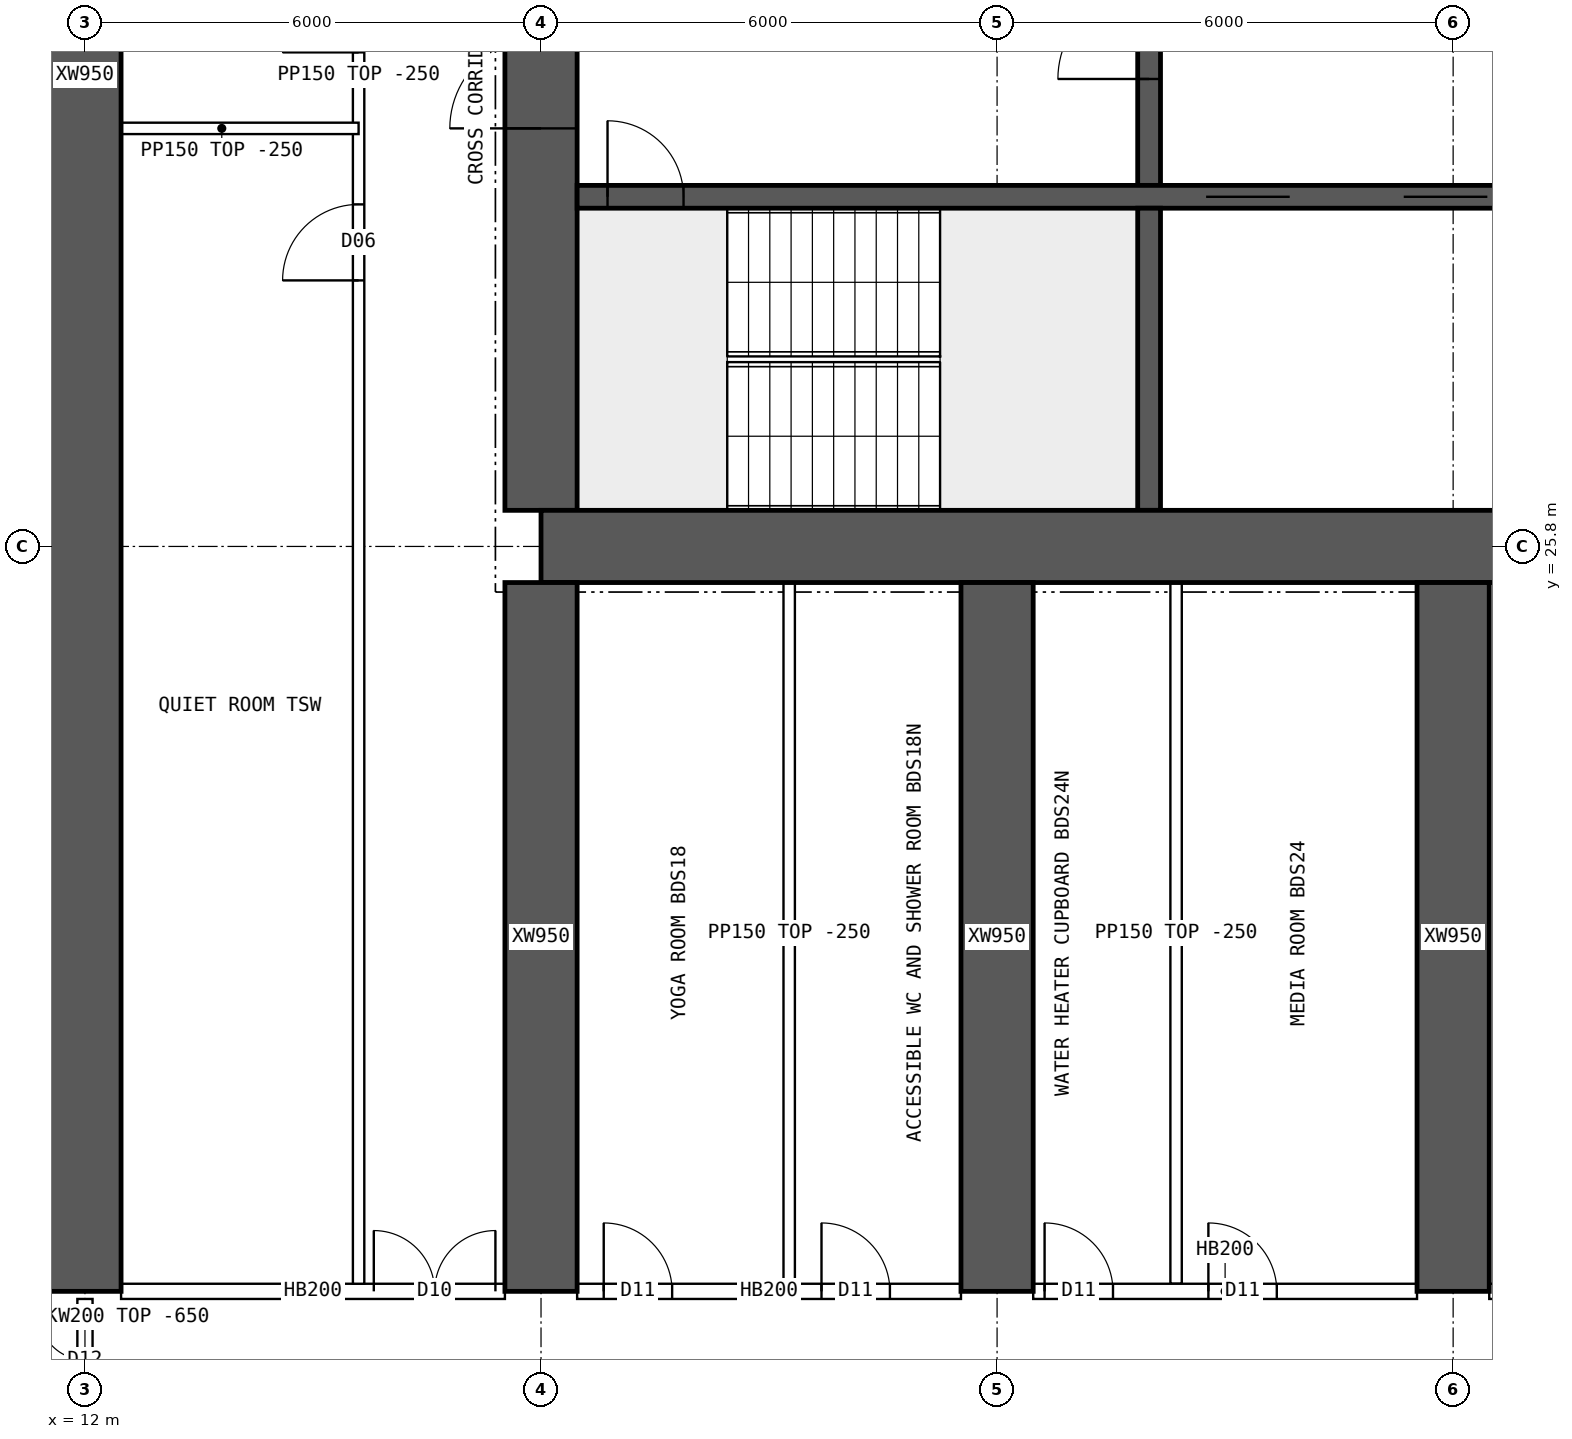
"""IFC4 building model, lengths in metres.
Left out: names, types, materials, properties, quantities, classifications, styles, units other than length and angle.
Written with IfcOpenShell. Run it as: python <this file> out.ifc"""

import sys

from ifc_helpers import new_model, si_unit, direction, frame, frame_2d, origin, place, context, subcontext, project, spatial, polyline, rectangle, outline, extrude, element, fill, save


model = new_model("IFC4")
c1 = context("Model", 3, precision=1e-05, world=origin(), true_north=direction((0.0, 1.0)))
c2 = subcontext(c1, "Body", "Model", "MODEL_VIEW")
j1 = project(units=[si_unit("LENGTHUNIT", "METRE"), si_unit("PLANEANGLEUNIT", "RADIAN")], contexts=[c1])
p1 = place(None, origin())
s1 = spatial("IfcSite", under=j1, at=p1, CompositionType="ELEMENT")
p2 = place(p1, origin())
s2 = spatial("IfcBuilding", under=s1, at=p2, CompositionType="ELEMENT")
p3 = place(p2, frame((0.0, 0.0, 84.4)))
s3 = spatial("IfcBuildingStorey", under=s2, at=p3, CompositionType="ELEMENT", Elevation=84.4)
p4 = place(p3, frame((18.0, 25.8, 0.0), z_axis=(0.0, 0.0, 1.0), x_axis=(1.0, 0.0, 0.0)))
e1 = element("IfcWall", 1, at=p4, inside=s3, PredefinedType="SHEAR", context=c2, shape_type="SweptSolid", body=[
    extrude(rectangle(XDim=48.0, YDim=0.95, at=frame_2d((24.0, 0.0))), origin(), (0.0, 0.0, 1.0), 3.75),
])
p5 = place(p3, frame((18.0, 26.275, 0.0), z_axis=(0.0, 0.0, 1.0), x_axis=(0.0, 1.0, 0.0)))
e2 = element("IfcWall", 2, at=p5, inside=s3, PredefinedType="SHEAR", context=c2, shape_type="SweptSolid", body=[
    extrude(rectangle(XDim=11.45, YDim=0.95, at=frame_2d((5.725, 0.0))), origin(), (0.0, 0.0, 1.0), 3.75),
])
p6 = place(p5, frame((5.025, 0.0, 0.0)))
e3 = element("IfcOpeningElement", 3, at=p6, cuts=e2, PredefinedType="OPENING", context=c2, shape_type="SweptSolid", body=[
    extrude(rectangle(XDim=1.2, YDim=2.1, at=frame_2d((0.6, 1.05))), frame((0.0, 0.485, 0.0), z_axis=(0.0, -1.0, 0.0), x_axis=(1.0, 0.0, 0.0)), (0.0, 0.0, 1.0), 0.97),
])
p7 = place(p3, frame((18.475, 30.4, 0.0), z_axis=(0.0, 0.0, 1.0), x_axis=(1.0, 0.0, 0.0)))
e4 = element("IfcWall", 4, at=p7, inside=s3, PredefinedType="SHEAR", context=c2, shape_type="SweptSolid", body=[
    extrude(rectangle(XDim=47.05, YDim=0.3, at=frame_2d((23.525, 0.0))), origin(), (0.0, 0.0, 1.0), 3.75),
])
p8 = place(p7, frame((0.4, 0.0, 0.0)))
e5 = element("IfcOpeningElement", 5, at=p8, cuts=e4, PredefinedType="OPENING", context=c2, shape_type="SweptSolid", body=[
    extrude(rectangle(XDim=1.0, YDim=2.1, at=frame_2d((0.5, 1.05))), frame((0.0, 0.16, 0.0), z_axis=(0.0, -1.0, 0.0), x_axis=(1.0, 0.0, 0.0)), (0.0, 0.0, 1.0), 0.32),
])
p9 = place(p7, frame((45.65, 0.0, 0.0)))
e6 = element("IfcOpeningElement", 6, at=p9, cuts=e4, PredefinedType="OPENING", context=c2, shape_type="SweptSolid", body=[
    extrude(rectangle(XDim=1.0, YDim=2.1, at=frame_2d((0.5, 1.05))), frame((0.0, 0.16, 0.0), z_axis=(0.0, -1.0, 0.0), x_axis=(1.0, 0.0, 0.0)), (0.0, 0.0, 1.0), 0.32),
])
p10 = place(p7, frame((8.275, 0.0, 0.0)))
e7 = element("IfcOpeningElement", 7, at=p10, cuts=e4, PredefinedType="OPENING", context=c2, shape_type="SweptSolid", body=[
    extrude(rectangle(XDim=1.1, YDim=2.1, at=frame_2d((0.55, 1.05))), frame((0.0, 0.16, 0.0), z_axis=(0.0, -1.0, 0.0), x_axis=(1.0, 0.0, 0.0)), (0.0, 0.0, 1.0), 0.32),
])
p11 = place(p7, frame((10.875, 0.0, 0.0)))
e8 = element("IfcOpeningElement", 8, at=p11, cuts=e4, PredefinedType="OPENING", context=c2, shape_type="SweptSolid", body=[
    extrude(rectangle(XDim=1.1, YDim=2.1, at=frame_2d((0.55, 1.05))), frame((0.0, 0.16, 0.0), z_axis=(0.0, -1.0, 0.0), x_axis=(1.0, 0.0, 0.0)), (0.0, 0.0, 1.0), 0.32),
])
p12 = place(p7, frame((13.475, 0.0, 0.0)))
e9 = element("IfcOpeningElement", 9, at=p12, cuts=e4, PredefinedType="OPENING", context=c2, shape_type="SweptSolid", body=[
    extrude(rectangle(XDim=1.1, YDim=2.1, at=frame_2d((0.55, 1.05))), frame((0.0, 0.16, 0.0), z_axis=(0.0, -1.0, 0.0), x_axis=(1.0, 0.0, 0.0)), (0.0, 0.0, 1.0), 0.32),
])
p13 = place(p7, frame((16.075, 0.0, 0.0)))
e10 = element("IfcOpeningElement", 10, at=p13, cuts=e4, PredefinedType="OPENING", context=c2, shape_type="SweptSolid", body=[
    extrude(rectangle(XDim=1.1, YDim=2.1, at=frame_2d((0.55, 1.05))), frame((0.0, 0.16, 0.0), z_axis=(0.0, -1.0, 0.0), x_axis=(1.0, 0.0, 0.0)), (0.0, 0.0, 1.0), 0.32),
])
p14 = place(p7, frame((18.85, 0.0, 0.0)))
e11 = element("IfcOpeningElement", 11, at=p14, cuts=e4, PredefinedType="OPENING", context=c2, shape_type="SweptSolid", body=[
    extrude(rectangle(XDim=0.9, YDim=2.1, at=frame_2d((0.45, 1.05))), frame((0.0, 0.16, 0.0), z_axis=(0.0, -1.0, 0.0), x_axis=(1.0, 0.0, 0.0)), (0.0, 0.0, 1.0), 0.32),
])
p15 = place(p7, frame((30.142, 0.0, 0.0)))
e12 = element("IfcOpeningElement", 12, at=p15, cuts=e4, PredefinedType="OPENING", context=c2, shape_type="SweptSolid", body=[
    extrude(rectangle(XDim=1.1, YDim=2.1, at=frame_2d((0.55, 1.05))), frame((0.0, 0.16, 0.0), z_axis=(0.0, -1.0, 0.0), x_axis=(1.0, 0.0, 0.0)), (0.0, 0.0, 1.0), 0.32),
])
p16 = place(p7, frame((33.675, 0.0, 0.0)))
e13 = element("IfcOpeningElement", 13, at=p16, cuts=e4, PredefinedType="OPENING", context=c2, shape_type="SweptSolid", body=[
    extrude(rectangle(XDim=1.1, YDim=2.1, at=frame_2d((0.55, 1.05))), frame((0.0, 0.16, 0.0), z_axis=(0.0, -1.0, 0.0), x_axis=(1.0, 0.0, 0.0)), (0.0, 0.0, 1.0), 0.32),
])
p17 = place(p7, frame((37.208, 0.0, 0.0)))
e14 = element("IfcOpeningElement", 14, at=p17, cuts=e4, PredefinedType="OPENING", context=c2, shape_type="SweptSolid", body=[
    extrude(rectangle(XDim=1.1, YDim=2.1, at=frame_2d((0.55, 1.05))), frame((0.0, 0.16, 0.0), z_axis=(0.0, -1.0, 0.0), x_axis=(1.0, 0.0, 0.0)), (0.0, 0.0, 1.0), 0.32),
])
p18 = place(p3, frame((26.0, 26.275, 0.0), z_axis=(0.0, 0.0, 1.0), x_axis=(0.0, 1.0, 0.0)))
e15 = element("IfcWall", 15, at=p18, inside=s3, PredefinedType="SHEAR", context=c2, shape_type="SweptSolid", body=[
    extrude(rectangle(XDim=3.975, YDim=0.3, at=frame_2d((1.988, 0.0))), origin(), (0.0, 0.0, 1.0), 3.75),
])
p19 = place(p3, frame((26.0, 30.55, 0.0), z_axis=(0.0, 0.0, 1.0), x_axis=(0.0, 1.0, 0.0)))
e16 = element("IfcWall", 16, at=p19, inside=s3, PredefinedType="SHEAR", context=c2, shape_type="SweptSolid", body=[
    extrude(rectangle(XDim=3.9, YDim=0.3, at=frame_2d((1.95, 0.0))), origin(), (0.0, 0.0, 1.0), 3.75),
])
p20 = place(p19, frame((1.4, 0.0, 0.0)))
e17 = element("IfcOpeningElement", 17, at=p20, cuts=e16, PredefinedType="OPENING", context=c2, shape_type="SweptSolid", body=[
    extrude(rectangle(XDim=1.2, YDim=2.1, at=frame_2d((0.6, 1.05))), frame((0.0, 0.16, 0.0), z_axis=(0.0, -1.0, 0.0), x_axis=(1.0, 0.0, 0.0)), (0.0, 0.0, 1.0), 0.32),
])
p21 = place(p3, frame((12.0, 16.0, 0.0), z_axis=(0.0, 0.0, 1.0), x_axis=(0.0, 1.0, 0.0)))
e18 = element("IfcWall", 18, at=p21, inside=s3, PredefinedType="SHEAR", context=c2, shape_type="SweptSolid", body=[
    extrude(rectangle(XDim=32.0, YDim=0.95, at=frame_2d((16.0, 0.0))), origin(), (0.0, 0.0, 1.0), 3.75),
])
for number, where, z_axis, x_axis in (
    (19, (18.0, 16.0, 0.0), (0.0, 0.0, 1.0), (0.0, 1.0, 0.0)),
    (20, (24.0, 16.0, 0.0), (0.0, 0.0, 1.0), (0.0, 1.0, 0.0)),
    (21, (30.0, 16.0, 0.0), (0.0, 0.0, 1.0), (0.0, 1.0, 0.0)),
):
    element("IfcWall", number, at=place(p3, frame(where, z_axis=z_axis, x_axis=x_axis)), inside=s3, PredefinedType="SHEAR", context=c2, shape_type="SweptSolid", body=[
        extrude(rectangle(XDim=9.325, YDim=0.95, at=frame_2d((4.663, 0.0))), origin(), (0.0, 0.0, 1.0), 3.75),
    ])
p22 = place(p3, frame((12.475, 16.0, 0.0), z_axis=(0.0, 0.0, 1.0), x_axis=(1.0, 0.0, 0.0)))
e22 = element("IfcWall", 22, at=p22, inside=s3, PredefinedType="SOLIDWALL", context=c2, shape_type="SweptSolid", body=[
    extrude(rectangle(XDim=5.05, YDim=0.2, at=frame_2d((2.525, 0.0))), origin(), (0.0, 0.0, 1.0), 3.5),
])
p23 = place(p22, frame((3.325, 0.0, 0.0)))
e23 = element("IfcOpeningElement", 23, at=p23, cuts=e22, PredefinedType="OPENING", context=c2, shape_type="SweptSolid", body=[
    extrude(rectangle(XDim=1.6, YDim=2.1, at=frame_2d((0.8, 1.05))), frame((0.0, 0.11, 0.0), z_axis=(0.0, -1.0, 0.0), x_axis=(1.0, 0.0, 0.0)), (0.0, 0.0, 1.0), 0.22),
])
p24 = place(p3, frame((18.475, 16.0, 0.0), z_axis=(0.0, 0.0, 1.0), x_axis=(1.0, 0.0, 0.0)))
e24 = element("IfcWall", 24, at=p24, inside=s3, PredefinedType="SOLIDWALL", context=c2, shape_type="SweptSolid", body=[
    extrude(rectangle(XDim=5.05, YDim=0.2, at=frame_2d((2.525, 0.0))), origin(), (0.0, 0.0, 1.0), 3.5),
])
p25 = place(p24, frame((0.35, 0.0, 0.0)))
e25 = element("IfcOpeningElement", 25, at=p25, cuts=e24, PredefinedType="OPENING", context=c2, shape_type="SweptSolid", body=[
    extrude(rectangle(XDim=0.9, YDim=2.1, at=frame_2d((0.45, 1.05))), frame((0.0, 0.11, 0.0), z_axis=(0.0, -1.0, 0.0), x_axis=(1.0, 0.0, 0.0)), (0.0, 0.0, 1.0), 0.22),
])
p26 = place(p24, frame((3.215, 0.0, 0.0)))
e26 = element("IfcOpeningElement", 26, at=p26, cuts=e24, PredefinedType="OPENING", context=c2, shape_type="SweptSolid", body=[
    extrude(rectangle(XDim=0.9, YDim=2.1, at=frame_2d((0.45, 1.05))), frame((0.0, 0.11, 0.0), z_axis=(0.0, -1.0, 0.0), x_axis=(1.0, 0.0, 0.0)), (0.0, 0.0, 1.0), 0.22),
])
p27 = place(p3, frame((24.475, 16.0, 0.0), z_axis=(0.0, 0.0, 1.0), x_axis=(1.0, 0.0, 0.0)))
e27 = element("IfcWall", 27, at=p27, inside=s3, PredefinedType="SOLIDWALL", context=c2, shape_type="SweptSolid", body=[
    extrude(rectangle(XDim=5.05, YDim=0.2, at=frame_2d((2.525, 0.0))), origin(), (0.0, 0.0, 1.0), 3.5),
])
p28 = place(p27, frame((0.15, 0.0, 0.0)))
e28 = element("IfcOpeningElement", 28, at=p28, cuts=e27, PredefinedType="OPENING", context=c2, shape_type="SweptSolid", body=[
    extrude(rectangle(XDim=0.9, YDim=2.1, at=frame_2d((0.45, 1.05))), frame((0.0, 0.11, 0.0), z_axis=(0.0, -1.0, 0.0), x_axis=(1.0, 0.0, 0.0)), (0.0, 0.0, 1.0), 0.22),
])
p29 = place(p27, frame((2.305, 0.0, 0.0)))
e29 = element("IfcOpeningElement", 29, at=p29, cuts=e27, PredefinedType="OPENING", context=c2, shape_type="SweptSolid", body=[
    extrude(rectangle(XDim=0.9, YDim=2.1, at=frame_2d((0.45, 1.05))), frame((0.0, 0.11, 0.0), z_axis=(0.0, -1.0, 0.0), x_axis=(1.0, 0.0, 0.0)), (0.0, 0.0, 1.0), 0.22),
])
p30 = place(p3, frame((30.475, 16.0, 0.0), z_axis=(0.0, 0.0, 1.0), x_axis=(1.0, 0.0, 0.0)))
e30 = element("IfcWall", 30, at=p30, inside=s3, PredefinedType="SOLIDWALL", context=c2, shape_type="SweptSolid", body=[
    extrude(rectangle(XDim=5.05, YDim=0.2, at=frame_2d((2.525, 0.0))), origin(), (0.0, 0.0, 1.0), 3.5),
])
p31 = place(p30, frame((0.35, 0.0, 0.0)))
e31 = element("IfcOpeningElement", 31, at=p31, cuts=e30, PredefinedType="OPENING", context=c2, shape_type="SweptSolid", body=[
    extrude(rectangle(XDim=0.9, YDim=2.1, at=frame_2d((0.45, 1.05))), frame((0.0, 0.11, 0.0), z_axis=(0.0, -1.0, 0.0), x_axis=(1.0, 0.0, 0.0)), (0.0, 0.0, 1.0), 0.22),
])
p32 = place(p30, frame((2.535, 0.0, 0.0)))
e32 = element("IfcOpeningElement", 32, at=p32, cuts=e30, PredefinedType="OPENING", context=c2, shape_type="SweptSolid", body=[
    extrude(rectangle(XDim=0.9, YDim=2.1, at=frame_2d((0.45, 1.05))), frame((0.0, 0.11, 0.0), z_axis=(0.0, -1.0, 0.0), x_axis=(1.0, 0.0, 0.0)), (0.0, 0.0, 1.0), 0.22),
])
for number, where, z_axis, x_axis in (
    (33, (21.265, 16.1, 0.0), (0.0, 0.0, 1.0), (0.0, 1.0, 0.0)),
    (34, (26.355, 16.1, 0.0), (0.0, 0.0, 1.0), (0.0, 1.0, 0.0)),
):
    element("IfcWall", number, at=place(p3, frame(where, z_axis=z_axis, x_axis=x_axis)), inside=s3, PredefinedType="PARTITIONING", context=c2, shape_type="SweptSolid", body=[
        extrude(rectangle(XDim=9.225, YDim=0.15, at=frame_2d((4.612, 0.0))), origin(), (0.0, 0.0, 1.0), 3.5),
    ])
p33 = place(p3, frame((15.6, 16.1, 0.0), z_axis=(0.0, 0.0, 1.0), x_axis=(0.0, 1.0, 0.0)))
e35 = element("IfcWall", 35, at=p33, inside=s3, PredefinedType="PARTITIONING", context=c2, shape_type="SweptSolid", body=[
    extrude(rectangle(XDim=31.8, YDim=0.15, at=frame_2d((15.9, 0.0))), origin(), (0.0, 0.0, 1.0), 3.5),
])
p34 = place(p33, frame((13.2, 0.0, 0.0)))
e36 = element("IfcOpeningElement", 36, at=p34, cuts=e35, PredefinedType="OPENING", context=c2, shape_type="SweptSolid", body=[
    extrude(rectangle(XDim=1.0, YDim=2.1, at=frame_2d((0.5, 1.05))), frame((0.0, 0.085, 0.0), z_axis=(0.0, -1.0, 0.0), x_axis=(1.0, 0.0, 0.0)), (0.0, 0.0, 1.0), 0.17),
])
p35 = place(p33, frame((16.2, 0.0, 0.0)))
e37 = element("IfcOpeningElement", 37, at=p35, cuts=e35, PredefinedType="OPENING", context=c2, shape_type="SweptSolid", body=[
    extrude(rectangle(XDim=1.0, YDim=2.1, at=frame_2d((0.5, 1.05))), frame((0.0, 0.085, 0.0), z_axis=(0.0, -1.0, 0.0), x_axis=(1.0, 0.0, 0.0)), (0.0, 0.0, 1.0), 0.17),
])
p36 = place(p3, frame((12.0, 31.3, 0.0), z_axis=(0.0, 0.0, 1.0), x_axis=(1.0, 0.0, 0.0)))
e38 = element("IfcWall", 38, at=p36, inside=s3, PredefinedType="PARTITIONING", context=c2, shape_type="SweptSolid", body=[
    extrude(rectangle(XDim=3.6, YDim=0.15, at=frame_2d((1.8, 0.0))), origin(), (0.0, 0.0, 1.0), 3.5),
])
p37 = place(p3, frame((3.905, 30.85, 0.0), z_axis=(0.0, 0.0, 1.0), x_axis=(1.0, 0.0, 0.0)))
e39 = element("IfcWall", 39, at=p37, inside=s3, PredefinedType="PARTITIONING", context=c2, shape_type="SweptSolid", body=[
    extrude(outline(polyline([(0.0, 0.0), (8.02, 0.0), (8.02, 3.5), (2.397, 3.5), (2.395, 3.05), (1.797, 3.05), (1.795, 3.5), (0.0, 3.5), (0.0, 0.0)])), frame((0.0, 0.075, 0.0), z_axis=(0.0, -1.0, 0.0), x_axis=(1.0, 0.0, 0.0)), (0.0, 0.0, 1.0), 0.15),
])
p38 = place(p3, frame((12.0, 14.3, 0.0), z_axis=(0.0, 0.0, 1.0), x_axis=(0.0, 1.0, 0.0)))
e40 = element("IfcWall", 40, at=p38, inside=s3, PredefinedType="SOLIDWALL", context=c2, shape_type="SweptSolid", body=[
    extrude(outline(polyline([(0.0, 0.0), (1.6, 0.0), (1.6, 3.1), (0.0, 3.1), (0.0, 0.0)])), frame((0.0, 0.1, 0.0), z_axis=(0.0, -1.0, 0.0), x_axis=(1.0, 0.0, 0.0)), (0.0, 0.0, 1.0), 0.2),
])
p39 = place(p38, frame((0.2, 0.0, 0.0)))
e41 = element("IfcOpeningElement", 41, at=p39, cuts=e40, PredefinedType="OPENING", context=c2, shape_type="SweptSolid", body=[
    extrude(rectangle(XDim=1.2, YDim=2.1, at=frame_2d((0.6, 1.05))), frame((0.0, 0.11, 0.0), z_axis=(0.0, -1.0, 0.0), x_axis=(1.0, 0.0, 0.0)), (0.0, 0.0, 1.0), 0.22),
])
p40 = place(p6, origin())
e42 = element("IfcDoor", 42, at=p40, inside=s3, OperationType="SINGLE_SWING_LEFT", PredefinedType="DOOR", context=c2, shape_type="SweptSolid", body=[
    extrude(rectangle(XDim=1.2, YDim=2.1, at=frame_2d((0.6, 1.05))), frame((0.0, 0.025, 0.0), z_axis=(0.0, -1.0, 0.0), x_axis=(1.0, 0.0, 0.0)), (0.0, 0.0, 1.0), 0.05),
])
fill(e3, e42)
p41 = place(p8, origin())
e43 = element("IfcDoor", 43, at=p41, inside=s3, OperationType="SINGLE_SWING_LEFT", PredefinedType="DOOR", context=c2, shape_type="SweptSolid", body=[
    extrude(rectangle(XDim=1.0, YDim=2.1, at=frame_2d((0.5, 1.05))), frame((0.0, 0.025, 0.0), z_axis=(0.0, -1.0, 0.0), x_axis=(1.0, 0.0, 0.0)), (0.0, 0.0, 1.0), 0.05),
])
fill(e5, e43)
p42 = place(p20, origin())
e44 = element("IfcDoor", 44, at=p42, inside=s3, OperationType="SINGLE_SWING_LEFT", PredefinedType="DOOR", context=c2, shape_type="SweptSolid", body=[
    extrude(rectangle(XDim=1.2, YDim=2.1, at=frame_2d((0.6, 1.05))), frame((0.0, 0.025, 0.0), z_axis=(0.0, -1.0, 0.0), x_axis=(1.0, 0.0, 0.0)), (0.0, 0.0, 1.0), 0.05),
])
fill(e17, e44)
p43 = place(p10, origin())
e45 = element("IfcDoor", 45, at=p43, inside=s3, OperationType="DOUBLE_DOOR_SLIDING", PredefinedType="DOOR", context=c2, shape_type="SweptSolid", body=[
    extrude(rectangle(XDim=1.1, YDim=2.1, at=frame_2d((0.55, 1.05))), frame((0.0, 0.025, 0.0), z_axis=(0.0, -1.0, 0.0), x_axis=(1.0, 0.0, 0.0)), (0.0, 0.0, 1.0), 0.05),
])
fill(e7, e45)
p44 = place(p11, origin())
e46 = element("IfcDoor", 46, at=p44, inside=s3, OperationType="DOUBLE_DOOR_SLIDING", PredefinedType="DOOR", context=c2, shape_type="SweptSolid", body=[
    extrude(rectangle(XDim=1.1, YDim=2.1, at=frame_2d((0.55, 1.05))), frame((0.0, 0.025, 0.0), z_axis=(0.0, -1.0, 0.0), x_axis=(1.0, 0.0, 0.0)), (0.0, 0.0, 1.0), 0.05),
])
fill(e8, e46)
p45 = place(p23, origin())
e47 = element("IfcDoor", 47, at=p45, inside=s3, OperationType="DOUBLE_DOOR_SINGLE_SWING", PredefinedType="DOOR", context=c2, shape_type="SweptSolid", body=[
    extrude(rectangle(XDim=1.6, YDim=2.1, at=frame_2d((0.8, 1.05))), frame((0.0, 0.025, 0.0), z_axis=(0.0, -1.0, 0.0), x_axis=(1.0, 0.0, 0.0)), (0.0, 0.0, 1.0), 0.05),
])
fill(e23, e47)
p46 = place(p25, origin())
e48 = element("IfcDoor", 48, at=p46, inside=s3, OperationType="SINGLE_SWING_LEFT", PredefinedType="DOOR", context=c2, shape_type="SweptSolid", body=[
    extrude(rectangle(XDim=0.9, YDim=2.1, at=frame_2d((0.45, 1.05))), frame((0.0, 0.025, 0.0), z_axis=(0.0, -1.0, 0.0), x_axis=(1.0, 0.0, 0.0)), (0.0, 0.0, 1.0), 0.05),
])
fill(e25, e48)
p47 = place(p26, origin())
e49 = element("IfcDoor", 49, at=p47, inside=s3, OperationType="SINGLE_SWING_LEFT", PredefinedType="DOOR", context=c2, shape_type="SweptSolid", body=[
    extrude(rectangle(XDim=0.9, YDim=2.1, at=frame_2d((0.45, 1.05))), frame((0.0, 0.025, 0.0), z_axis=(0.0, -1.0, 0.0), x_axis=(1.0, 0.0, 0.0)), (0.0, 0.0, 1.0), 0.05),
])
fill(e26, e49)
p48 = place(p28, origin())
e50 = element("IfcDoor", 50, at=p48, inside=s3, OperationType="SINGLE_SWING_LEFT", PredefinedType="DOOR", context=c2, shape_type="SweptSolid", body=[
    extrude(rectangle(XDim=0.9, YDim=2.1, at=frame_2d((0.45, 1.05))), frame((0.0, 0.025, 0.0), z_axis=(0.0, -1.0, 0.0), x_axis=(1.0, 0.0, 0.0)), (0.0, 0.0, 1.0), 0.05),
])
fill(e28, e50)
p49 = place(p29, origin())
e51 = element("IfcDoor", 51, at=p49, inside=s3, OperationType="SINGLE_SWING_LEFT", PredefinedType="DOOR", context=c2, shape_type="SweptSolid", body=[
    extrude(rectangle(XDim=0.9, YDim=2.1, at=frame_2d((0.45, 1.05))), frame((0.0, 0.025, 0.0), z_axis=(0.0, -1.0, 0.0), x_axis=(1.0, 0.0, 0.0)), (0.0, 0.0, 1.0), 0.05),
])
fill(e29, e51)
p50 = place(p34, origin())
e52 = element("IfcDoor", 52, at=p50, inside=s3, OperationType="SINGLE_SWING_LEFT", PredefinedType="DOOR", context=c2, shape_type="SweptSolid", body=[
    extrude(rectangle(XDim=1.0, YDim=2.1, at=frame_2d((0.5, 1.05))), frame((0.0, 0.025, 0.0), z_axis=(0.0, -1.0, 0.0), x_axis=(1.0, 0.0, 0.0)), (0.0, 0.0, 1.0), 0.05),
])
fill(e36, e52)
p51 = place(p39, origin())
e53 = element("IfcDoor", 53, at=p51, inside=s3, OperationType="DOUBLE_DOOR_SINGLE_SWING", PredefinedType="DOOR", context=c2, shape_type="SweptSolid", body=[
    extrude(rectangle(XDim=1.2, YDim=2.1, at=frame_2d((0.6, 1.05))), frame((0.0, 0.025, 0.0), z_axis=(0.0, -1.0, 0.0), x_axis=(1.0, 0.0, 0.0)), (0.0, 0.0, 1.0), 0.05),
])
fill(e41, e53)
save(model, sys.argv[1])
